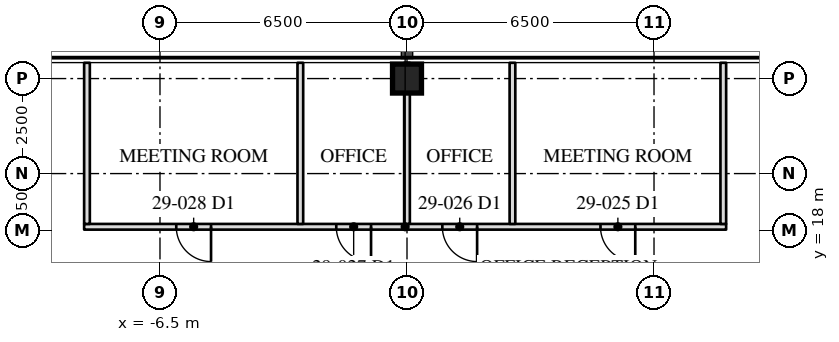
"""IFC4 building model, lengths in metres.
Left out: names, types, materials, properties, quantities, classifications, styles, units other than length and angle.
Written with IfcOpenShell. Run it as: python <this file> out.ifc"""

import sys

from ifc_helpers import new_model, si_unit, direction, frame, frame_2d, origin, origin_2d, place, context, subcontext, project, spatial, rectangle, hollow_rectangle, extrude, element, fill, save


model = new_model("IFC4")
c1 = context("Model", 3, precision=1e-05, world=origin(), true_north=direction((0.0, 1.0)))
c2 = subcontext(c1, "Body", "Model", "MODEL_VIEW")
j1 = project(units=[si_unit("LENGTHUNIT", "METRE"), si_unit("PLANEANGLEUNIT", "RADIAN")], contexts=[c1])
p1 = place(None, origin())
s1 = spatial("IfcSite", under=j1, at=p1, CompositionType="ELEMENT")
p2 = place(p1, origin())
s2 = spatial("IfcBuilding", under=s1, at=p2, CompositionType="ELEMENT")
p3 = place(p2, frame((0.0, 0.0, 125.4)))
s3 = spatial("IfcBuildingStorey", under=s2, at=p3, CompositionType="ELEMENT", Elevation=125.4)
p4 = place(p3, frame((0.0, 22.0, 0.0), z_axis=(0.0, 0.0, 1.0), x_axis=(1.0, 0.0, 0.0)))
e1 = element("IfcColumn", 1, at=p4, inside=s3, PredefinedType="COLUMN", context=c2, shape_type="SweptSolid", body=[
    extrude(hollow_rectangle(XDim=0.762, YDim=0.762, WallThickness=0.076, at=origin_2d()), origin(), (0.0, 0.0, 1.0), 4.1),
])
p5 = place(p3, frame((8.398, 18.1, 0.0), z_axis=(0.0, 0.0, 1.0), x_axis=(-1.0, 0.0, 0.0)))
e2 = element("IfcWall", 2, at=p5, inside=s3, PredefinedType="PARTITIONING", context=c2, shape_type="SweptSolid", body=[
    extrude(rectangle(XDim=16.894, YDim=0.15, at=frame_2d((8.447, 0.0))), origin(), (0.0, 0.0, 1.0), 3.91),
])
p6 = place(p5, frame((2.392, 0.0, 0.0)))
e3 = element("IfcOpeningElement", 3, at=p6, cuts=e2, PredefinedType="OPENING", context=c2, shape_type="SweptSolid", body=[
    extrude(rectangle(XDim=0.915, YDim=2.134, at=frame_2d((0.458, 1.067))), frame((0.0, 0.085, 0.0), z_axis=(0.0, -1.0, 0.0), x_axis=(1.0, 0.0, 0.0)), (0.0, 0.0, 1.0), 0.17),
])
p7 = place(p5, frame((6.553, 0.0, 0.0)))
e4 = element("IfcOpeningElement", 4, at=p7, cuts=e2, PredefinedType="OPENING", context=c2, shape_type="SweptSolid", body=[
    extrude(rectangle(XDim=0.915, YDim=2.134, at=frame_2d((0.458, 1.067))), frame((0.0, 0.085, 0.0), z_axis=(0.0, -1.0, 0.0), x_axis=(1.0, 0.0, 0.0)), (0.0, 0.0, 1.0), 0.17),
])
p8 = place(p5, frame((9.344, 0.0, 0.0)))
e5 = element("IfcOpeningElement", 5, at=p8, cuts=e2, PredefinedType="OPENING", context=c2, shape_type="SweptSolid", body=[
    extrude(rectangle(XDim=0.915, YDim=2.134, at=frame_2d((0.458, 1.067))), frame((0.0, 0.085, 0.0), z_axis=(0.0, -1.0, 0.0), x_axis=(1.0, 0.0, 0.0)), (0.0, 0.0, 1.0), 0.17),
])
p9 = place(p5, frame((13.554, 0.0, 0.0)))
e6 = element("IfcOpeningElement", 6, at=p9, cuts=e2, PredefinedType="OPENING", context=c2, shape_type="SweptSolid", body=[
    extrude(rectangle(XDim=0.915, YDim=2.134, at=frame_2d((0.458, 1.067))), frame((0.0, 0.085, 0.0), z_axis=(0.0, -1.0, 0.0), x_axis=(1.0, 0.0, 0.0)), (0.0, 0.0, 1.0), 0.17),
])
for number, where, z_axis, x_axis in (
    (7, (8.323, 18.175, 0.0), (0.0, 0.0, 1.0), (0.0, 1.0, 0.0)),
    (8, (2.775, 18.175, 0.0), (0.0, 0.0, 1.0), (0.0, 1.0, 0.0)),
):
    element("IfcWall", number, at=place(p3, frame(where, z_axis=z_axis, x_axis=x_axis)), inside=s3, PredefinedType="PARTITIONING", context=c2, shape_type="SweptSolid", body=[
        extrude(rectangle(XDim=4.24, YDim=0.15, at=frame_2d((2.12, 0.0))), origin(), (0.0, 0.0, 1.0), 3.91),
    ])
p10 = place(p3, frame((0.0, 18.175, 0.0), z_axis=(0.0, 0.0, 1.0), x_axis=(0.0, 1.0, 0.0)))
e9 = element("IfcWall", 9, at=p10, inside=s3, PredefinedType="PARTITIONING", context=c2, shape_type="SweptSolid", body=[
    extrude(rectangle(XDim=4.24, YDim=0.15, at=frame_2d((2.12, 0.0))), origin(), (0.0, 0.0, 1.0), 3.326),
])
for number, where, z_axis, x_axis in (
    (10, (-2.807, 18.175, 0.0), (0.0, 0.0, 1.0), (0.0, 1.0, 0.0)),
    (11, (-8.421, 18.175, 0.0), (0.0, 0.0, 1.0), (0.0, 1.0, 0.0)),
):
    element("IfcWall", number, at=place(p3, frame(where, z_axis=z_axis, x_axis=x_axis)), inside=s3, PredefinedType="PARTITIONING", context=c2, shape_type="SweptSolid", body=[
        extrude(rectangle(XDim=4.24, YDim=0.15, at=frame_2d((2.12, 0.0))), origin(), (0.0, 0.0, 1.0), 3.91),
    ])
p11 = place(p6, origin())
e12 = element("IfcDoor", 12, at=p11, inside=s3, OperationType="SINGLE_SWING_LEFT", PredefinedType="DOOR", context=c2, shape_type="SweptSolid", body=[
    extrude(rectangle(XDim=0.915, YDim=2.134, at=frame_2d((0.458, 1.067))), frame((0.0, 0.025, 0.0), z_axis=(0.0, -1.0, 0.0), x_axis=(1.0, 0.0, 0.0)), (0.0, 0.0, 1.0), 0.05),
])
fill(e3, e12)
p12 = place(p7, origin())
e13 = element("IfcDoor", 13, at=p12, inside=s3, OperationType="SINGLE_SWING_LEFT", PredefinedType="DOOR", context=c2, shape_type="SweptSolid", body=[
    extrude(rectangle(XDim=0.915, YDim=2.134, at=frame_2d((0.458, 1.067))), frame((0.0, 0.025, 0.0), z_axis=(0.0, -1.0, 0.0), x_axis=(1.0, 0.0, 0.0)), (0.0, 0.0, 1.0), 0.05),
])
fill(e4, e13)
p13 = place(p8, origin())
e14 = element("IfcDoor", 14, at=p13, inside=s3, OperationType="SINGLE_SWING_LEFT", PredefinedType="DOOR", context=c2, shape_type="SweptSolid", body=[
    extrude(rectangle(XDim=0.915, YDim=2.134, at=frame_2d((0.458, 1.067))), frame((0.0, 0.025, 0.0), z_axis=(0.0, -1.0, 0.0), x_axis=(1.0, 0.0, 0.0)), (0.0, 0.0, 1.0), 0.05),
])
fill(e5, e14)
p14 = place(p9, origin())
e15 = element("IfcDoor", 15, at=p14, inside=s3, OperationType="SINGLE_SWING_LEFT", PredefinedType="DOOR", context=c2, shape_type="SweptSolid", body=[
    extrude(rectangle(XDim=0.915, YDim=2.134, at=frame_2d((0.458, 1.067))), frame((0.0, 0.025, 0.0), z_axis=(0.0, -1.0, 0.0), x_axis=(1.0, 0.0, 0.0)), (0.0, 0.0, 1.0), 0.05),
])
fill(e6, e15)
save(model, sys.argv[1])
